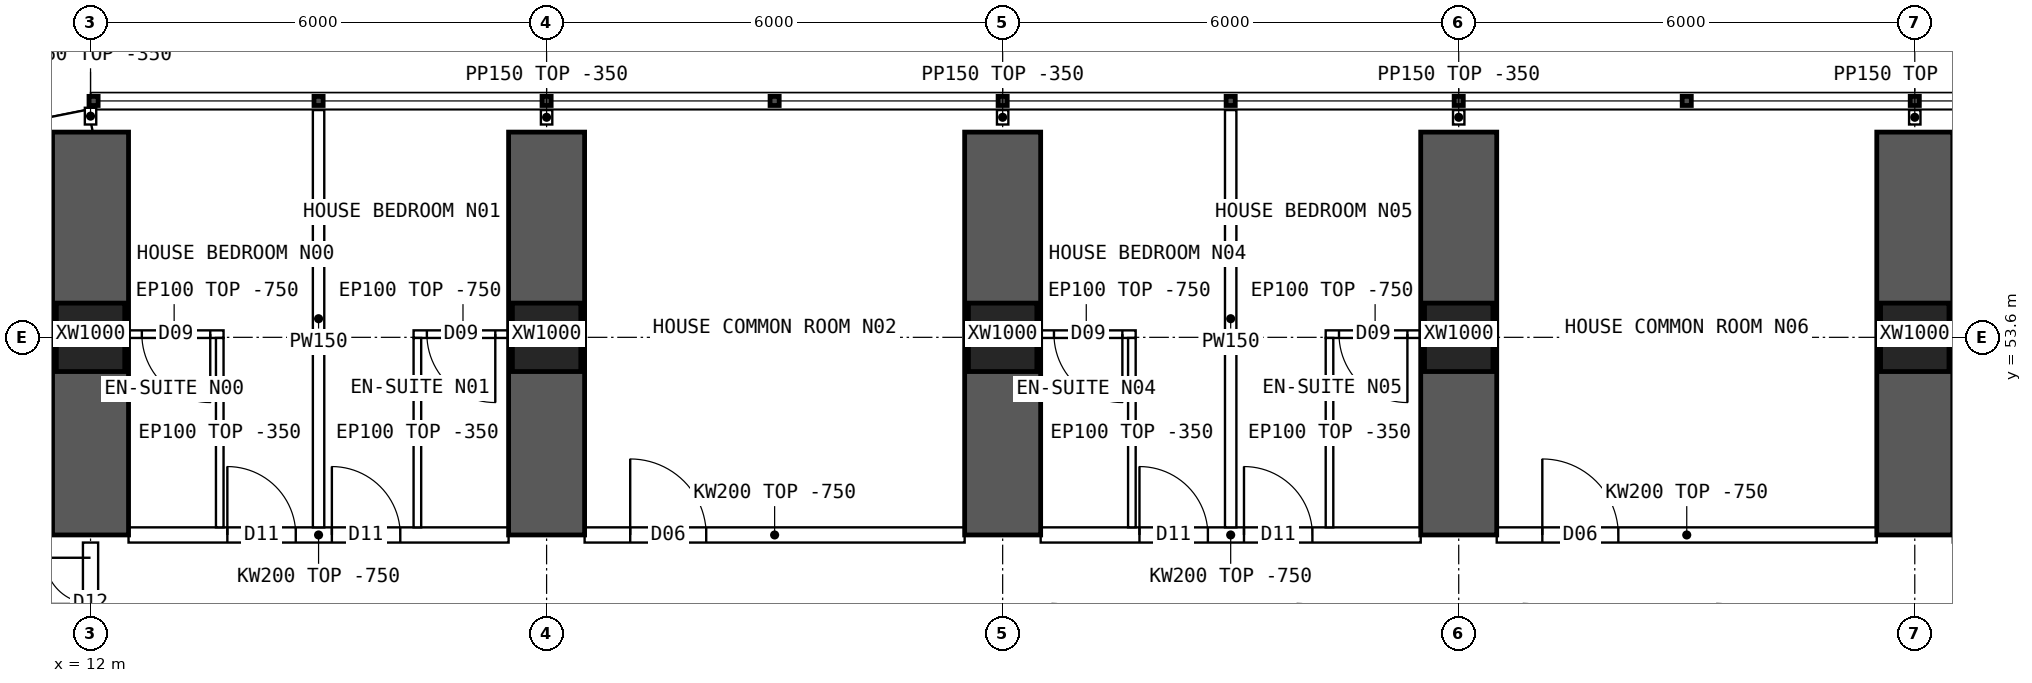
"""IFC4 building model, lengths in metres.
Left out: names, types, materials, properties, quantities, classifications, styles, units other than length and angle.
Written with IfcOpenShell. Run it as: python <this file> out.ifc"""

import sys

from ifc_helpers import new_model, si_unit, direction, frame, frame_2d, origin, origin_2d, place, context, subcontext, project, spatial, polyline, rectangle, hollow_rectangle, outline, extrude, element, fill, save


model = new_model("IFC4")
c1 = context("Model", 3, precision=1e-05, world=origin(), true_north=direction((0.0, 1.0)))
c2 = subcontext(c1, "Body", "Model", "MODEL_VIEW")
j1 = project(units=[si_unit("LENGTHUNIT", "METRE"), si_unit("PLANEANGLEUNIT", "RADIAN")], contexts=[c1])
p1 = place(None, origin())
s1 = spatial("IfcSite", under=j1, at=p1, CompositionType="ELEMENT")
p2 = place(p1, origin())
s2 = spatial("IfcBuilding", under=s1, at=p2, CompositionType="ELEMENT")
p3 = place(p2, frame((0.0, 0.0, 65.2)))
s3 = spatial("IfcBuildingStorey", under=s2, at=p3, CompositionType="ELEMENT", Elevation=65.2)
for number, where, z_axis, x_axis in (
    (1, (12.0, 53.6, 0.0), (0.0, 0.0, 1.0), (1.0, 0.0, 0.0)),
    (2, (18.0, 53.6, 0.0), (0.0, 0.0, 1.0), (1.0, 0.0, 0.0)),
    (3, (24.0, 53.6, 0.0), (0.0, 0.0, 1.0), (1.0, 0.0, 0.0)),
    (4, (30.0, 53.6, 0.0), (0.0, 0.0, 1.0), (1.0, 0.0, 0.0)),
    (5, (36.0, 53.6, 0.0), (0.0, 0.0, 1.0), (1.0, 0.0, 0.0)),
):
    element("IfcColumn", number, at=place(p3, frame(where, z_axis=z_axis, x_axis=x_axis)), inside=s3, PredefinedType="COLUMN", context=c2, shape_type="SweptSolid", body=[
        extrude(hollow_rectangle(XDim=0.9, YDim=0.9, WallThickness=0.09, at=origin_2d()), origin(), (0.0, 0.0, 1.0), 3.75),
    ])
for number, where, z_axis, x_axis in (
    (6, (12.0, 51.0, 0.0), (0.0, 0.0, 1.0), (0.0, 1.0, 0.0)),
    (7, (18.0, 51.0, 0.0), (0.0, 0.0, 1.0), (0.0, 1.0, 0.0)),
    (8, (24.0, 51.0, 0.0), (0.0, 0.0, 1.0), (0.0, 1.0, 0.0)),
    (9, (30.0, 51.0, 0.0), (0.0, 0.0, 1.0), (0.0, 1.0, 0.0)),
    (10, (36.0, 51.0, 0.0), (0.0, 0.0, 1.0), (0.0, 1.0, 0.0)),
):
    element("IfcWall", number, at=place(p3, frame(where, z_axis=z_axis, x_axis=x_axis)), inside=s3, PredefinedType="SHEAR", context=c2, shape_type="SweptSolid", body=[
        extrude(rectangle(XDim=5.3, YDim=1.0, at=frame_2d((2.65, 0.0))), origin(), (0.0, 0.0, 1.0), 3.75),
    ])
p4 = place(p3, frame((12.0, 56.45, 0.0), z_axis=(0.0, 0.0, 1.0), x_axis=(-0.980787251524, -0.195080412259, 0.0)))
e11 = element("IfcWall", 11, at=p4, inside=s3, PredefinedType="SOLIDWALL", context=c2, shape_type="SweptSolid", body=[
    extrude(outline(polyline([(-0.03, -0.15), (3.249, -0.15), (3.189, 0.15), (0.03, 0.15), (-0.03, -0.15)])), origin(), (0.0, 0.0, 1.0), 3.4),
])
p5 = place(p4, frame((0.909, 0.0, 0.9)))
e12 = element("IfcOpeningElement", 12, at=p5, cuts=e11, PredefinedType="OPENING", context=c2, shape_type="SweptSolid", body=[
    extrude(rectangle(XDim=1.4, YDim=1.8, at=frame_2d((0.7, 0.9))), frame((0.0, 0.16, 0.0), z_axis=(0.0, -1.0, 0.0), x_axis=(1.0, 0.0, 0.0)), (0.0, 0.0, 1.0), 0.32),
])
p6 = place(p3, frame((12.5, 51.0, 0.0), z_axis=(0.0, 0.0, 1.0), x_axis=(1.0, 0.0, 0.0)))
e13 = element("IfcWall", 13, at=p6, inside=s3, PredefinedType="SOLIDWALL", context=c2, shape_type="SweptSolid", body=[
    extrude(outline(polyline([(0.0, 0.0), (5.0, 0.0), (5.0, 3.0), (0.0, 3.0), (0.0, 0.0)])), frame((0.0, 0.1, 0.0), z_axis=(0.0, -1.0, 0.0), x_axis=(1.0, 0.0, 0.0)), (0.0, 0.0, 1.0), 0.2),
])
p7 = place(p6, frame((1.3, 0.0, 0.0)))
e14 = element("IfcOpeningElement", 14, at=p7, cuts=e13, PredefinedType="OPENING", context=c2, shape_type="SweptSolid", body=[
    extrude(rectangle(XDim=0.9, YDim=2.1, at=frame_2d((0.45, 1.05))), frame((0.0, 0.11, 0.0), z_axis=(0.0, -1.0, 0.0), x_axis=(1.0, 0.0, 0.0)), (0.0, 0.0, 1.0), 0.22),
])
p8 = place(p6, frame((2.675, 0.0, 0.0)))
e15 = element("IfcOpeningElement", 15, at=p8, cuts=e13, PredefinedType="OPENING", context=c2, shape_type="SweptSolid", body=[
    extrude(rectangle(XDim=0.9, YDim=2.1, at=frame_2d((0.45, 1.05))), frame((0.0, 0.11, 0.0), z_axis=(0.0, -1.0, 0.0), x_axis=(1.0, 0.0, 0.0)), (0.0, 0.0, 1.0), 0.22),
])
p9 = place(p3, frame((18.5, 51.0, 0.0), z_axis=(0.0, 0.0, 1.0), x_axis=(1.0, 0.0, 0.0)))
e16 = element("IfcWall", 16, at=p9, inside=s3, PredefinedType="SOLIDWALL", context=c2, shape_type="SweptSolid", body=[
    extrude(outline(polyline([(0.0, 0.0), (5.0, 0.0), (5.0, 3.0), (0.0, 3.0), (0.0, 0.0)])), frame((0.0, 0.1, 0.0), z_axis=(0.0, -1.0, 0.0), x_axis=(1.0, 0.0, 0.0)), (0.0, 0.0, 1.0), 0.2),
])
p10 = place(p9, frame((0.6, 0.0, 0.0)))
e17 = element("IfcOpeningElement", 17, at=p10, cuts=e16, PredefinedType="OPENING", context=c2, shape_type="SweptSolid", body=[
    extrude(rectangle(XDim=1.0, YDim=2.1, at=frame_2d((0.5, 1.05))), frame((0.0, 0.11, 0.0), z_axis=(0.0, -1.0, 0.0), x_axis=(1.0, 0.0, 0.0)), (0.0, 0.0, 1.0), 0.22),
])
p11 = place(p3, frame((24.5, 51.0, 0.0), z_axis=(0.0, 0.0, 1.0), x_axis=(1.0, 0.0, 0.0)))
e18 = element("IfcWall", 18, at=p11, inside=s3, PredefinedType="SOLIDWALL", context=c2, shape_type="SweptSolid", body=[
    extrude(outline(polyline([(0.0, 0.0), (5.0, 0.0), (5.0, 3.0), (0.0, 3.0), (0.0, 0.0)])), frame((0.0, 0.1, 0.0), z_axis=(0.0, -1.0, 0.0), x_axis=(1.0, 0.0, 0.0)), (0.0, 0.0, 1.0), 0.2),
])
p12 = place(p11, frame((1.3, 0.0, 0.0)))
e19 = element("IfcOpeningElement", 19, at=p12, cuts=e18, PredefinedType="OPENING", context=c2, shape_type="SweptSolid", body=[
    extrude(rectangle(XDim=0.9, YDim=2.1, at=frame_2d((0.45, 1.05))), frame((0.0, 0.11, 0.0), z_axis=(0.0, -1.0, 0.0), x_axis=(1.0, 0.0, 0.0)), (0.0, 0.0, 1.0), 0.22),
])
p13 = place(p11, frame((2.675, 0.0, 0.0)))
e20 = element("IfcOpeningElement", 20, at=p13, cuts=e18, PredefinedType="OPENING", context=c2, shape_type="SweptSolid", body=[
    extrude(rectangle(XDim=0.9, YDim=2.1, at=frame_2d((0.45, 1.05))), frame((0.0, 0.11, 0.0), z_axis=(0.0, -1.0, 0.0), x_axis=(1.0, 0.0, 0.0)), (0.0, 0.0, 1.0), 0.22),
])
p14 = place(p3, frame((30.5, 51.0, 0.0), z_axis=(0.0, 0.0, 1.0), x_axis=(1.0, 0.0, 0.0)))
e21 = element("IfcWall", 21, at=p14, inside=s3, PredefinedType="SOLIDWALL", context=c2, shape_type="SweptSolid", body=[
    extrude(outline(polyline([(0.0, 0.0), (5.0, 0.0), (5.0, 3.0), (0.0, 3.0), (0.0, 0.0)])), frame((0.0, 0.1, 0.0), z_axis=(0.0, -1.0, 0.0), x_axis=(1.0, 0.0, 0.0)), (0.0, 0.0, 1.0), 0.2),
])
p15 = place(p14, frame((0.6, 0.0, 0.0)))
e22 = element("IfcOpeningElement", 22, at=p15, cuts=e21, PredefinedType="OPENING", context=c2, shape_type="SweptSolid", body=[
    extrude(rectangle(XDim=1.0, YDim=2.1, at=frame_2d((0.5, 1.05))), frame((0.0, 0.11, 0.0), z_axis=(0.0, -1.0, 0.0), x_axis=(1.0, 0.0, 0.0)), (0.0, 0.0, 1.0), 0.22),
])
p16 = place(p3, frame((15.0, 56.59, 0.0), z_axis=(0.0, 0.0, 1.0), x_axis=(0.0, -1.0, 0.0)))
e23 = element("IfcWall", 23, at=p16, inside=s3, PredefinedType="PARTITIONING", context=c2, shape_type="SweptSolid", body=[
    extrude(outline(polyline([(0.0, 0.0), (5.49, 0.0), (5.49, 3.0), (5.442, 3.0), (5.44, 3.4), (3.192, 3.4), (3.19, 3.0), (2.792, 3.0), (2.79, 3.4), (0.0, 3.4), (0.0, 0.0)])), frame((0.0, 0.075, 0.0), z_axis=(0.0, -1.0, 0.0), x_axis=(1.0, 0.0, 0.0)), (0.0, 0.0, 1.0), 0.15),
])
p17 = place(p3, frame((12.45, 53.642, 0.0), z_axis=(0.0, 0.0, 1.0), x_axis=(1.0, 0.0, 0.0)))
e24 = element("IfcWall", 24, at=p17, inside=s3, PredefinedType="PARTITIONING", context=c2, shape_type="SweptSolid", body=[
    extrude(outline(polyline([(0.0, 0.0), (1.3, 0.0), (1.3, 3.0), (0.0, 3.0), (0.0, 0.0)])), frame((0.0, 0.05, 0.0), z_axis=(0.0, -1.0, 0.0), x_axis=(1.0, 0.0, 0.0)), (0.0, 0.0, 1.0), 0.1),
])
p18 = place(p17, frame((0.225, 0.0, 0.0)))
e25 = element("IfcOpeningElement", 25, at=p18, cuts=e24, PredefinedType="OPENING", context=c2, shape_type="SweptSolid", body=[
    extrude(rectangle(XDim=0.9, YDim=2.1, at=frame_2d((0.45, 1.05))), frame((0.0, 0.06, 0.0), z_axis=(0.0, -1.0, 0.0), x_axis=(1.0, 0.0, 0.0)), (0.0, 0.0, 1.0), 0.12),
])
p19 = place(p3, frame((13.7, 53.592, 0.0), z_axis=(0.0, 0.0, 1.0), x_axis=(0.0, -1.0, 0.0)))
e26 = element("IfcWall", 26, at=p19, inside=s3, PredefinedType="PARTITIONING", context=c2, shape_type="SweptSolid", body=[
    extrude(outline(polyline([(0.0, 0.0), (2.492, 0.0), (2.492, 3.0), (2.444, 3.0), (2.442, 3.4), (0.194, 3.4), (0.192, 3.0), (0.0, 3.0), (0.0, 0.0)])), frame((0.0, 0.05, 0.0), z_axis=(0.0, -1.0, 0.0), x_axis=(1.0, 0.0, 0.0)), (0.0, 0.0, 1.0), 0.1),
])
p20 = place(p3, frame((16.25, 53.642, 0.0), z_axis=(0.0, 0.0, 1.0), x_axis=(1.0, 0.0, 0.0)))
e27 = element("IfcWall", 27, at=p20, inside=s3, PredefinedType="PARTITIONING", context=c2, shape_type="SweptSolid", body=[
    extrude(outline(polyline([(0.0, 0.0), (1.3, 0.0), (1.3, 3.0), (0.0, 3.0), (0.0, 0.0)])), frame((0.0, 0.05, 0.0), z_axis=(0.0, -1.0, 0.0), x_axis=(1.0, 0.0, 0.0)), (0.0, 0.0, 1.0), 0.1),
])
p21 = place(p20, frame((0.175, 0.0, 0.0)))
e28 = element("IfcOpeningElement", 28, at=p21, cuts=e27, PredefinedType="OPENING", context=c2, shape_type="SweptSolid", body=[
    extrude(rectangle(XDim=0.9, YDim=2.1, at=frame_2d((0.45, 1.05))), frame((0.0, 0.06, 0.0), z_axis=(0.0, -1.0, 0.0), x_axis=(1.0, 0.0, 0.0)), (0.0, 0.0, 1.0), 0.12),
])
p22 = place(p3, frame((16.3, 53.592, 0.0), z_axis=(0.0, 0.0, 1.0), x_axis=(0.0, -1.0, 0.0)))
e29 = element("IfcWall", 29, at=p22, inside=s3, PredefinedType="PARTITIONING", context=c2, shape_type="SweptSolid", body=[
    extrude(outline(polyline([(0.0, 0.0), (2.492, 0.0), (2.492, 3.0), (2.444, 3.0), (2.442, 3.4), (0.194, 3.4), (0.192, 3.0), (0.0, 3.0), (0.0, 0.0)])), frame((0.0, 0.05, 0.0), z_axis=(0.0, -1.0, 0.0), x_axis=(1.0, 0.0, 0.0)), (0.0, 0.0, 1.0), 0.1),
])
p23 = place(p3, frame((27.0, 56.59, 0.0), z_axis=(0.0, 0.0, 1.0), x_axis=(0.0, -1.0, 0.0)))
e30 = element("IfcWall", 30, at=p23, inside=s3, PredefinedType="PARTITIONING", context=c2, shape_type="SweptSolid", body=[
    extrude(outline(polyline([(0.0, 0.0), (5.49, 0.0), (5.49, 3.0), (5.442, 3.0), (5.44, 3.4), (3.192, 3.4), (3.19, 3.0), (2.792, 3.0), (2.79, 3.4), (0.0, 3.4), (0.0, 0.0)])), frame((0.0, 0.075, 0.0), z_axis=(0.0, -1.0, 0.0), x_axis=(1.0, 0.0, 0.0)), (0.0, 0.0, 1.0), 0.15),
])
p24 = place(p3, frame((24.45, 53.642, 0.0), z_axis=(0.0, 0.0, 1.0), x_axis=(1.0, 0.0, 0.0)))
e31 = element("IfcWall", 31, at=p24, inside=s3, PredefinedType="PARTITIONING", context=c2, shape_type="SweptSolid", body=[
    extrude(outline(polyline([(0.0, 0.0), (1.3, 0.0), (1.3, 3.0), (0.0, 3.0), (0.0, 0.0)])), frame((0.0, 0.05, 0.0), z_axis=(0.0, -1.0, 0.0), x_axis=(1.0, 0.0, 0.0)), (0.0, 0.0, 1.0), 0.1),
])
p25 = place(p24, frame((0.225, 0.0, 0.0)))
e32 = element("IfcOpeningElement", 32, at=p25, cuts=e31, PredefinedType="OPENING", context=c2, shape_type="SweptSolid", body=[
    extrude(rectangle(XDim=0.9, YDim=2.1, at=frame_2d((0.45, 1.05))), frame((0.0, 0.06, 0.0), z_axis=(0.0, -1.0, 0.0), x_axis=(1.0, 0.0, 0.0)), (0.0, 0.0, 1.0), 0.12),
])
p26 = place(p3, frame((25.7, 53.592, 0.0), z_axis=(0.0, 0.0, 1.0), x_axis=(0.0, -1.0, 0.0)))
e33 = element("IfcWall", 33, at=p26, inside=s3, PredefinedType="PARTITIONING", context=c2, shape_type="SweptSolid", body=[
    extrude(outline(polyline([(0.0, 0.0), (2.492, 0.0), (2.492, 3.0), (2.444, 3.0), (2.442, 3.4), (0.194, 3.4), (0.192, 3.0), (0.0, 3.0), (0.0, 0.0)])), frame((0.0, 0.05, 0.0), z_axis=(0.0, -1.0, 0.0), x_axis=(1.0, 0.0, 0.0)), (0.0, 0.0, 1.0), 0.1),
])
p27 = place(p3, frame((28.25, 53.642, 0.0), z_axis=(0.0, 0.0, 1.0), x_axis=(1.0, 0.0, 0.0)))
e34 = element("IfcWall", 34, at=p27, inside=s3, PredefinedType="PARTITIONING", context=c2, shape_type="SweptSolid", body=[
    extrude(outline(polyline([(0.0, 0.0), (1.3, 0.0), (1.3, 3.0), (0.0, 3.0), (0.0, 0.0)])), frame((0.0, 0.05, 0.0), z_axis=(0.0, -1.0, 0.0), x_axis=(1.0, 0.0, 0.0)), (0.0, 0.0, 1.0), 0.1),
])
p28 = place(p27, frame((0.175, 0.0, 0.0)))
e35 = element("IfcOpeningElement", 35, at=p28, cuts=e34, PredefinedType="OPENING", context=c2, shape_type="SweptSolid", body=[
    extrude(rectangle(XDim=0.9, YDim=2.1, at=frame_2d((0.45, 1.05))), frame((0.0, 0.06, 0.0), z_axis=(0.0, -1.0, 0.0), x_axis=(1.0, 0.0, 0.0)), (0.0, 0.0, 1.0), 0.12),
])
p29 = place(p3, frame((28.3, 53.592, 0.0), z_axis=(0.0, 0.0, 1.0), x_axis=(0.0, -1.0, 0.0)))
e36 = element("IfcWall", 36, at=p29, inside=s3, PredefinedType="PARTITIONING", context=c2, shape_type="SweptSolid", body=[
    extrude(outline(polyline([(0.0, 0.0), (2.492, 0.0), (2.492, 3.0), (2.444, 3.0), (2.442, 3.4), (0.194, 3.4), (0.192, 3.0), (0.0, 3.0), (0.0, 0.0)])), frame((0.0, 0.05, 0.0), z_axis=(0.0, -1.0, 0.0), x_axis=(1.0, 0.0, 0.0)), (0.0, 0.0, 1.0), 0.1),
])
p30 = place(p3, frame((12.0, 49.3, 0.0), z_axis=(0.0, 0.0, 1.0), x_axis=(0.0, 1.0, 0.0)))
e37 = element("IfcWall", 37, at=p30, inside=s3, PredefinedType="SOLIDWALL", context=c2, shape_type="SweptSolid", body=[
    extrude(outline(polyline([(0.0, 0.0), (1.6, 0.0), (1.6, 2.95), (0.0, 2.95), (0.0, 0.0)])), frame((0.0, 0.1, 0.0), z_axis=(0.0, -1.0, 0.0), x_axis=(1.0, 0.0, 0.0)), (0.0, 0.0, 1.0), 0.2),
])
p31 = place(p30, frame((0.2, 0.0, 0.0)))
e38 = element("IfcOpeningElement", 38, at=p31, cuts=e37, PredefinedType="OPENING", context=c2, shape_type="SweptSolid", body=[
    extrude(rectangle(XDim=1.2, YDim=2.1, at=frame_2d((0.6, 1.05))), frame((0.0, 0.11, 0.0), z_axis=(0.0, -1.0, 0.0), x_axis=(1.0, 0.0, 0.0)), (0.0, 0.0, 1.0), 0.22),
])
p32 = place(p3, frame((12.0, 56.4, 0.0), z_axis=(0.0, 0.0, 1.0), x_axis=(0.0, 1.0, 0.0)))
e39 = element("IfcWall", 39, at=p32, inside=s3, PredefinedType="PARTITIONING", context=c2, shape_type="SweptSolid", body=[
    extrude(rectangle(XDim=0.22, YDim=0.15, at=frame_2d((0.11, 0.0))), origin(), (0.0, 0.0, 1.0), 3.4),
])
for number, where, z_axis, x_axis in (
    (40, (18.0, 56.4, 0.0), (0.0, 0.0, 1.0), (0.0, 1.0, 0.0)),
    (41, (24.0, 56.4, 0.0), (0.0, 0.0, 1.0), (0.0, 1.0, 0.0)),
    (42, (30.0, 56.4, 0.0), (0.0, 0.0, 1.0), (0.0, 1.0, 0.0)),
    (43, (36.0, 56.4, 0.0), (0.0, 0.0, 1.0), (0.0, 1.0, 0.0)),
):
    element("IfcWall", number, at=place(p3, frame(where, z_axis=z_axis, x_axis=x_axis)), inside=s3, PredefinedType="PARTITIONING", context=c2, shape_type="SweptSolid", body=[
        extrude(rectangle(XDim=0.19, YDim=0.15, at=frame_2d((0.095, 0.0))), origin(), (0.0, 0.0, 1.0), 3.4),
    ])
p33 = place(p18, origin())
e44 = element("IfcDoor", 44, at=p33, inside=s3, OperationType="SINGLE_SWING_RIGHT", PredefinedType="DOOR", context=c2, shape_type="SweptSolid", body=[
    extrude(rectangle(XDim=0.9, YDim=2.1, at=frame_2d((0.45, 1.05))), frame((0.0, 0.025, 0.0), z_axis=(0.0, -1.0, 0.0), x_axis=(1.0, 0.0, 0.0)), (0.0, 0.0, 1.0), 0.05),
])
fill(e25, e44)
p34 = place(p7, origin())
e45 = element("IfcDoor", 45, at=p34, inside=s3, OperationType="SINGLE_SWING_LEFT", PredefinedType="DOOR", context=c2, shape_type="SweptSolid", body=[
    extrude(rectangle(XDim=0.9, YDim=2.1, at=frame_2d((0.45, 1.05))), frame((0.0, 0.025, 0.0), z_axis=(0.0, -1.0, 0.0), x_axis=(1.0, 0.0, 0.0)), (0.0, 0.0, 1.0), 0.05),
])
fill(e14, e45)
p35 = place(p21, origin())
e46 = element("IfcDoor", 46, at=p35, inside=s3, OperationType="SINGLE_SWING_RIGHT", PredefinedType="DOOR", context=c2, shape_type="SweptSolid", body=[
    extrude(rectangle(XDim=0.9, YDim=2.1, at=frame_2d((0.45, 1.05))), frame((0.0, 0.025, 0.0), z_axis=(0.0, -1.0, 0.0), x_axis=(1.0, 0.0, 0.0)), (0.0, 0.0, 1.0), 0.05),
])
fill(e28, e46)
p36 = place(p8, origin())
e47 = element("IfcDoor", 47, at=p36, inside=s3, OperationType="SINGLE_SWING_LEFT", PredefinedType="DOOR", context=c2, shape_type="SweptSolid", body=[
    extrude(rectangle(XDim=0.9, YDim=2.1, at=frame_2d((0.45, 1.05))), frame((0.0, 0.025, 0.0), z_axis=(0.0, -1.0, 0.0), x_axis=(1.0, 0.0, 0.0)), (0.0, 0.0, 1.0), 0.05),
])
fill(e15, e47)
p37 = place(p10, origin())
e48 = element("IfcDoor", 48, at=p37, inside=s3, OperationType="SINGLE_SWING_LEFT", PredefinedType="DOOR", context=c2, shape_type="SweptSolid", body=[
    extrude(rectangle(XDim=1.0, YDim=2.1, at=frame_2d((0.5, 1.05))), frame((0.0, 0.025, 0.0), z_axis=(0.0, -1.0, 0.0), x_axis=(1.0, 0.0, 0.0)), (0.0, 0.0, 1.0), 0.05),
])
fill(e17, e48)
p38 = place(p25, origin())
e49 = element("IfcDoor", 49, at=p38, inside=s3, OperationType="SINGLE_SWING_RIGHT", PredefinedType="DOOR", context=c2, shape_type="SweptSolid", body=[
    extrude(rectangle(XDim=0.9, YDim=2.1, at=frame_2d((0.45, 1.05))), frame((0.0, 0.025, 0.0), z_axis=(0.0, -1.0, 0.0), x_axis=(1.0, 0.0, 0.0)), (0.0, 0.0, 1.0), 0.05),
])
fill(e32, e49)
p39 = place(p12, origin())
e50 = element("IfcDoor", 50, at=p39, inside=s3, OperationType="SINGLE_SWING_LEFT", PredefinedType="DOOR", context=c2, shape_type="SweptSolid", body=[
    extrude(rectangle(XDim=0.9, YDim=2.1, at=frame_2d((0.45, 1.05))), frame((0.0, 0.025, 0.0), z_axis=(0.0, -1.0, 0.0), x_axis=(1.0, 0.0, 0.0)), (0.0, 0.0, 1.0), 0.05),
])
fill(e19, e50)
p40 = place(p28, origin())
e51 = element("IfcDoor", 51, at=p40, inside=s3, OperationType="SINGLE_SWING_RIGHT", PredefinedType="DOOR", context=c2, shape_type="SweptSolid", body=[
    extrude(rectangle(XDim=0.9, YDim=2.1, at=frame_2d((0.45, 1.05))), frame((0.0, 0.025, 0.0), z_axis=(0.0, -1.0, 0.0), x_axis=(1.0, 0.0, 0.0)), (0.0, 0.0, 1.0), 0.05),
])
fill(e35, e51)
p41 = place(p13, origin())
e52 = element("IfcDoor", 52, at=p41, inside=s3, OperationType="SINGLE_SWING_LEFT", PredefinedType="DOOR", context=c2, shape_type="SweptSolid", body=[
    extrude(rectangle(XDim=0.9, YDim=2.1, at=frame_2d((0.45, 1.05))), frame((0.0, 0.025, 0.0), z_axis=(0.0, -1.0, 0.0), x_axis=(1.0, 0.0, 0.0)), (0.0, 0.0, 1.0), 0.05),
])
fill(e20, e52)
p42 = place(p15, origin())
e53 = element("IfcDoor", 53, at=p42, inside=s3, OperationType="SINGLE_SWING_LEFT", PredefinedType="DOOR", context=c2, shape_type="SweptSolid", body=[
    extrude(rectangle(XDim=1.0, YDim=2.1, at=frame_2d((0.5, 1.05))), frame((0.0, 0.025, 0.0), z_axis=(0.0, -1.0, 0.0), x_axis=(1.0, 0.0, 0.0)), (0.0, 0.0, 1.0), 0.05),
])
fill(e22, e53)
p43 = place(p31, origin())
e54 = element("IfcDoor", 54, at=p43, inside=s3, OperationType="DOUBLE_DOOR_SINGLE_SWING", PredefinedType="DOOR", context=c2, shape_type="SweptSolid", body=[
    extrude(rectangle(XDim=1.2, YDim=2.1, at=frame_2d((0.6, 1.05))), frame((0.0, 0.025, 0.0), z_axis=(0.0, -1.0, 0.0), x_axis=(1.0, 0.0, 0.0)), (0.0, 0.0, 1.0), 0.05),
])
fill(e38, e54)
save(model, sys.argv[1])
